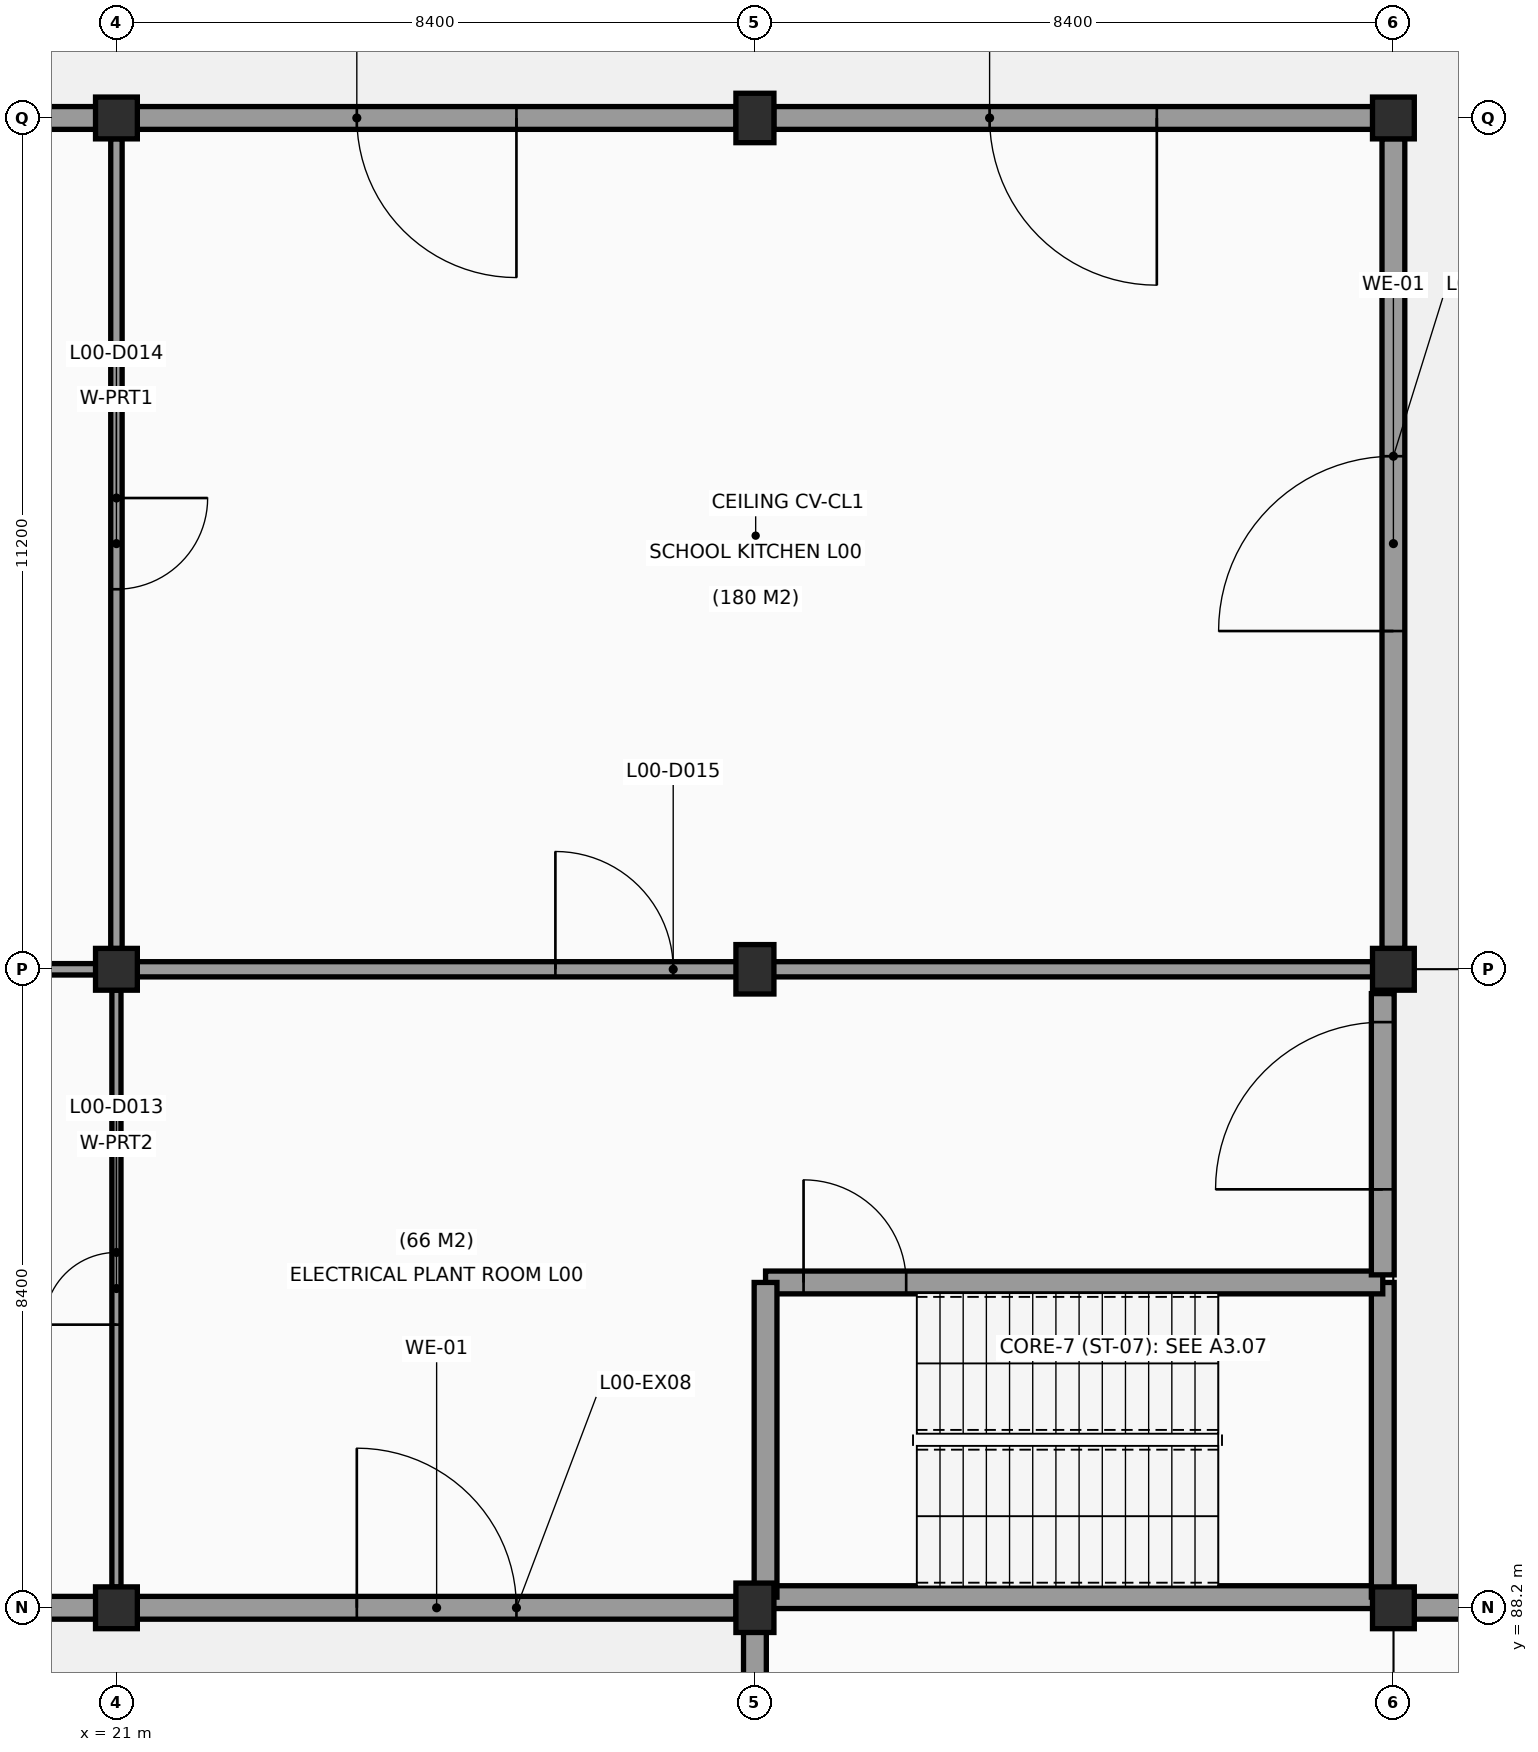
"""IFC4 building model, lengths in metres.
Left out: names, types, materials, properties, quantities, classifications, styles, units other than length and angle.
Written with IfcOpenShell. Run it as: python <this file> out.ifc"""

import sys

from ifc_helpers import new_model, si_unit, direction, frame, frame_2d, origin, origin_2d, place, context, subcontext, project, spatial, rectangle, extrude, element, fill, save


model = new_model("IFC4")
c1 = context("Model", 3, precision=1e-05, world=origin(), true_north=direction((0.0, 1.0)))
c2 = subcontext(c1, "Body", "Model", "MODEL_VIEW")
j1 = project(units=[si_unit("LENGTHUNIT", "METRE"), si_unit("PLANEANGLEUNIT", "RADIAN")], contexts=[c1])
p1 = place(None, origin())
s1 = spatial("IfcSite", under=j1, at=p1, CompositionType="ELEMENT")
p2 = place(p1, origin())
s2 = spatial("IfcBuilding", under=s1, at=p2, CompositionType="ELEMENT")
p3 = place(p2, origin())
s3 = spatial("IfcBuildingStorey", under=s2, at=p3, CompositionType="ELEMENT", Elevation=0.0)
for number, where, z_axis, x_axis in (
    (1, (21.0, 88.2, -0.4), (0.0, 0.0, 1.0), (1.0, 0.0, 0.0)),
    (2, (21.0, 96.6, -0.4), (0.0, 0.0, 1.0), (1.0, 0.0, 0.0)),
    (3, (21.0, 107.8, -0.4), (0.0, 0.0, 1.0), (1.0, 0.0, 0.0)),
):
    element("IfcColumn", number, at=place(p3, frame(where, z_axis=z_axis, x_axis=x_axis)), inside=s3, PredefinedType="COLUMN", context=c2, shape_type="SweptSolid", body=[
        extrude(rectangle(XDim=0.55, YDim=0.55, at=origin_2d()), origin(), (0.0, 0.0, 1.0), 4.6),
    ])
for number, where, z_axis, x_axis in (
    (4, (29.4, 88.2, -0.4), (0.0, 0.0, 1.0), (1.0, 0.0, 0.0)),
    (5, (29.4, 96.6, -0.4), (0.0, 0.0, 1.0), (1.0, 0.0, 0.0)),
    (6, (29.4, 107.8, -0.4), (0.0, 0.0, 1.0), (1.0, 0.0, 0.0)),
):
    element("IfcColumn", number, at=place(p3, frame(where, z_axis=z_axis, x_axis=x_axis)), inside=s3, PredefinedType="COLUMN", context=c2, shape_type="SweptSolid", body=[
        extrude(rectangle(XDim=0.5, YDim=0.65, at=origin_2d()), origin(), (0.0, 0.0, 1.0), 4.6),
    ])
for number, where, z_axis, x_axis in (
    (7, (37.8, 88.2, -0.4), (0.0, 0.0, 1.0), (1.0, 0.0, 0.0)),
    (8, (37.8, 96.6, -0.4), (0.0, 0.0, 1.0), (1.0, 0.0, 0.0)),
    (9, (37.8, 107.8, -0.4), (0.0, 0.0, 1.0), (1.0, 0.0, 0.0)),
):
    element("IfcColumn", number, at=place(p3, frame(where, z_axis=z_axis, x_axis=x_axis)), inside=s3, PredefinedType="COLUMN", context=c2, shape_type="SweptSolid", body=[
        extrude(rectangle(XDim=0.55, YDim=0.55, at=origin_2d()), origin(), (0.0, 0.0, 1.0), 4.6),
    ])
p4 = place(p3, frame((29.4, 80.123, 0.0), z_axis=(0.0, 0.0, 1.0), x_axis=(0.0, 1.0, 0.0)))
e10 = element("IfcWall", 10, at=p4, inside=s3, PredefinedType="SOLIDWALL", context=c2, shape_type="SweptSolid", body=[
    extrude(rectangle(XDim=7.754, YDim=0.3, at=frame_2d((3.877, 0.0))), origin(), (0.0, 0.0, 1.0), 3.22),
])
p5 = place(p4, frame((2.877, 0.0, 0.0)))
e11 = element("IfcOpeningElement", 11, at=p5, cuts=e10, PredefinedType="OPENING", context=c2, shape_type="SweptSolid", body=[
    extrude(rectangle(XDim=2.0, YDim=2.25, at=frame_2d((1.0, 1.125))), frame((0.0, 0.16, 0.0), z_axis=(0.0, -1.0, 0.0), x_axis=(1.0, 0.0, 0.0)), (0.0, 0.0, 1.0), 0.32),
])
p6 = place(p3, frame((29.152, 88.2, 0.0), z_axis=(0.0, 0.0, 1.0), x_axis=(-1.0, 0.0, 0.0)))
e12 = element("IfcWall", 12, at=p6, inside=s3, PredefinedType="SOLIDWALL", context=c2, shape_type="SweptSolid", body=[
    extrude(rectangle(XDim=7.879, YDim=0.3, at=frame_2d((3.939, 0.0))), origin(), (0.0, 0.0, 1.0), 3.22),
])
p7 = place(p6, frame((2.889, 0.0, 0.0)))
e13 = element("IfcOpeningElement", 13, at=p7, cuts=e12, PredefinedType="OPENING", context=c2, shape_type="SweptSolid", body=[
    extrude(rectangle(XDim=2.1, YDim=2.3, at=frame_2d((1.05, 1.15))), frame((0.0, 0.16, 0.0), z_axis=(0.0, -1.0, 0.0), x_axis=(1.0, 0.0, 0.0)), (0.0, 0.0, 1.0), 0.32),
])
p8 = place(p3, frame((20.727, 88.2, 0.0), z_axis=(0.0, 0.0, 1.0), x_axis=(-1.0, 0.0, 0.0)))
e14 = element("IfcWall", 14, at=p8, inside=s3, PredefinedType="SOLIDWALL", context=c2, shape_type="SweptSolid", body=[
    extrude(rectangle(XDim=7.854, YDim=0.3, at=frame_2d((3.927, 0.0))), origin(), (0.0, 0.0, 1.0), 3.22),
])
p9 = place(p8, frame((2.827, 0.0, 0.0)))
e15 = element("IfcOpeningElement", 15, at=p9, cuts=e14, PredefinedType="OPENING", context=c2, shape_type="SweptSolid", body=[
    extrude(rectangle(XDim=2.2, YDim=2.35, at=frame_2d((1.1, 1.175))), frame((0.0, 0.16, 0.0), z_axis=(0.0, -1.0, 0.0), x_axis=(1.0, 0.0, 0.0)), (0.0, 0.0, 1.0), 0.32),
])
p10 = place(p3, frame((12.873, 107.8, 0.0), z_axis=(0.0, 0.0, 1.0), x_axis=(1.0, 0.0, 0.0)))
e16 = element("IfcWall", 16, at=p10, inside=s3, PredefinedType="SOLIDWALL", context=c2, shape_type="SweptSolid", body=[
    extrude(rectangle(XDim=7.854, YDim=0.3, at=frame_2d((3.927, 0.0))), origin(), (0.0, 0.0, 1.0), 3.22),
])
p11 = place(p10, frame((2.927, 0.0, 0.0)))
e17 = element("IfcOpeningElement", 17, at=p11, cuts=e16, PredefinedType="OPENING", context=c2, shape_type="SweptSolid", body=[
    extrude(rectangle(XDim=2.0, YDim=2.25, at=frame_2d((1.0, 1.125))), frame((0.0, 0.16, 0.0), z_axis=(0.0, -1.0, 0.0), x_axis=(1.0, 0.0, 0.0)), (0.0, 0.0, 1.0), 0.32),
])
p12 = place(p3, frame((21.273, 107.8, 0.0), z_axis=(0.0, 0.0, 1.0), x_axis=(1.0, 0.0, 0.0)))
e18 = element("IfcWall", 18, at=p12, inside=s3, PredefinedType="SOLIDWALL", context=c2, shape_type="SweptSolid", body=[
    extrude(rectangle(XDim=7.879, YDim=0.3, at=frame_2d((3.939, 0.0))), origin(), (0.0, 0.0, 1.0), 3.22),
])
p13 = place(p12, frame((2.889, 0.0, 0.0)))
e19 = element("IfcOpeningElement", 19, at=p13, cuts=e18, PredefinedType="OPENING", context=c2, shape_type="SweptSolid", body=[
    extrude(rectangle(XDim=2.1, YDim=2.3, at=frame_2d((1.05, 1.15))), frame((0.0, 0.16, 0.0), z_axis=(0.0, -1.0, 0.0), x_axis=(1.0, 0.0, 0.0)), (0.0, 0.0, 1.0), 0.32),
])
p14 = place(p3, frame((29.648, 107.8, 0.0), z_axis=(0.0, 0.0, 1.0), x_axis=(1.0, 0.0, 0.0)))
e20 = element("IfcWall", 20, at=p14, inside=s3, PredefinedType="SOLIDWALL", context=c2, shape_type="SweptSolid", body=[
    extrude(rectangle(XDim=7.879, YDim=0.3, at=frame_2d((3.939, 0.0))), origin(), (0.0, 0.0, 1.0), 3.22),
])
p15 = place(p14, frame((2.84, 0.0, 0.0)))
e21 = element("IfcOpeningElement", 21, at=p15, cuts=e20, PredefinedType="OPENING", context=c2, shape_type="SweptSolid", body=[
    extrude(rectangle(XDim=2.2, YDim=2.35, at=frame_2d((1.1, 1.175))), frame((0.0, 0.16, 0.0), z_axis=(0.0, -1.0, 0.0), x_axis=(1.0, 0.0, 0.0)), (0.0, 0.0, 1.0), 0.32),
])
p16 = place(p3, frame((37.8, 107.527, 0.0), z_axis=(0.0, 0.0, 1.0), x_axis=(0.0, -1.0, 0.0)))
e22 = element("IfcWall", 22, at=p16, inside=s3, PredefinedType="SOLIDWALL", context=c2, shape_type="SweptSolid", body=[
    extrude(rectangle(XDim=10.654, YDim=0.3, at=frame_2d((5.327, 0.0))), origin(), (0.0, 0.0, 1.0), 3.22),
])
p17 = place(p16, frame((4.177, 0.0, 0.0)))
e23 = element("IfcOpeningElement", 23, at=p17, cuts=e22, PredefinedType="OPENING", context=c2, shape_type="SweptSolid", body=[
    extrude(rectangle(XDim=2.3, YDim=2.4, at=frame_2d((1.15, 1.2))), frame((0.0, 0.16, 0.0), z_axis=(0.0, -1.0, 0.0), x_axis=(1.0, 0.0, 0.0)), (0.0, 0.0, 1.0), 0.32),
])
p18 = place(p3, frame((38.073, 88.2, 0.0), z_axis=(0.0, 0.0, 1.0), x_axis=(1.0, 0.0, 0.0)))
e24 = element("IfcWall", 24, at=p18, inside=s3, PredefinedType="SOLIDWALL", context=c2, shape_type="SweptSolid", body=[
    extrude(rectangle(XDim=2.479, YDim=0.3, at=frame_2d((1.24, 0.0))), origin(), (0.0, 0.0, 1.0), 3.22),
])
p19 = place(p18, frame((0.639, 0.0, 0.95)))
e25 = element("IfcOpeningElement", 25, at=p19, cuts=e24, PredefinedType="OPENING", context=c2, shape_type="SweptSolid", body=[
    extrude(rectangle(XDim=1.2, YDim=1.5, at=frame_2d((0.6, 0.75))), frame((0.0, 0.16, 0.0), z_axis=(0.0, -1.0, 0.0), x_axis=(1.0, 0.0, 0.0)), (0.0, 0.0, 1.0), 0.32),
])
p20 = place(p3, frame((29.54, 88.34, -0.4), z_axis=(0.0, 0.0, 1.0), x_axis=(1.0, 0.0, 0.0)))
e26 = element("IfcWall", 26, at=p20, inside=s3, PredefinedType="SHEAR", context=c2, shape_type="SweptSolid", body=[
    extrude(rectangle(XDim=8.12, YDim=0.3, at=frame_2d((4.06, 0.0))), origin(), (0.0, 0.0, 1.0), 4.6),
])
p21 = place(p3, frame((37.66, 88.34, -0.4), z_axis=(0.0, 0.0, 1.0), x_axis=(0.0, 1.0, 0.0)))
e27 = element("IfcWall", 27, at=p21, inside=s3, PredefinedType="SHEAR", context=c2, shape_type="SweptSolid", body=[
    extrude(rectangle(XDim=4.14, YDim=0.3, at=frame_2d((2.07, 0.0))), origin(), (0.0, 0.0, 1.0), 4.6),
])
p22 = place(p3, frame((37.66, 92.48, -0.4), z_axis=(0.0, 0.0, 1.0), x_axis=(-1.0, 0.0, 0.0)))
e28 = element("IfcWall", 28, at=p22, inside=s3, PredefinedType="SHEAR", context=c2, shape_type="SweptSolid", body=[
    extrude(rectangle(XDim=8.12, YDim=0.3, at=frame_2d((4.06, 0.0))), origin(), (0.0, 0.0, 1.0), 4.6),
])
p23 = place(p22, frame((6.27, 0.0, 0.4)))
e29 = element("IfcOpeningElement", 29, at=p23, cuts=e28, PredefinedType="OPENING", context=c2, shape_type="SweptSolid", body=[
    extrude(rectangle(XDim=1.35, YDim=2.15, at=frame_2d((0.675, 1.075))), frame((0.0, 0.16, 0.0), z_axis=(0.0, -1.0, 0.0), x_axis=(1.0, 0.0, 0.0)), (0.0, 0.0, 1.0), 0.32),
])
p24 = place(p3, frame((29.54, 92.48, -0.4), z_axis=(0.0, 0.0, 1.0), x_axis=(0.0, -1.0, 0.0)))
e30 = element("IfcWall", 30, at=p24, inside=s3, PredefinedType="SHEAR", context=c2, shape_type="SweptSolid", body=[
    extrude(rectangle(XDim=4.14, YDim=0.3, at=frame_2d((2.07, 0.0))), origin(), (0.0, 0.0, 1.0), 4.6),
])
p25 = place(p3, frame((37.66, 92.58, -0.4), z_axis=(0.0, 0.0, 1.0), x_axis=(0.0, 1.0, 0.0)))
e31 = element("IfcWall", 31, at=p25, inside=s3, PredefinedType="SHEAR", context=c2, shape_type="SweptSolid", body=[
    extrude(rectangle(XDim=3.7, YDim=0.3, at=frame_2d((1.85, 0.0))), origin(), (0.0, 0.0, 1.0), 4.32),
])
p26 = place(p25, frame((1.125, 0.0, 0.4)))
e32 = element("IfcOpeningElement", 32, at=p26, cuts=e31, PredefinedType="OPENING", context=c2, shape_type="SweptSolid", body=[
    extrude(rectangle(XDim=2.2, YDim=2.35, at=frame_2d((1.1, 1.175))), frame((0.0, 0.16, 0.0), z_axis=(0.0, -1.0, 0.0), x_axis=(1.0, 0.0, 0.0)), (0.0, 0.0, 1.0), 0.32),
])
p27 = place(p3, frame((4.473, 96.6, 0.0), z_axis=(0.0, 0.0, 1.0), x_axis=(1.0, 0.0, 0.0)))
e33 = element("IfcWall", 33, at=p27, inside=s3, PredefinedType="PARTITIONING", context=c2, shape_type="SweptSolid", body=[
    extrude(rectangle(XDim=16.254, YDim=0.15, at=frame_2d((8.127, 0.0))), origin(), (0.0, 0.0, 1.0), 3.92),
])
p28 = place(p3, frame((21.0, 96.327, 0.0), z_axis=(0.0, 0.0, 1.0), x_axis=(0.0, -1.0, 0.0)))
e34 = element("IfcWall", 34, at=p28, inside=s3, PredefinedType="PARTITIONING", context=c2, shape_type="SweptSolid", body=[
    extrude(rectangle(XDim=7.854, YDim=0.12, at=frame_2d((3.927, 0.0))), origin(), (0.0, 0.0, 1.0), 3.22),
])
p29 = place(p28, frame((3.452, 0.0, 0.0)))
e35 = element("IfcOpeningElement", 35, at=p29, cuts=e34, PredefinedType="OPENING", context=c2, shape_type="SweptSolid", body=[
    extrude(rectangle(XDim=0.95, YDim=2.1, at=frame_2d((0.475, 1.05))), frame((0.0, 0.07, 0.0), z_axis=(0.0, -1.0, 0.0), x_axis=(1.0, 0.0, 0.0)), (0.0, 0.0, 1.0), 0.14),
])
p30 = place(p3, frame((21.0, 107.527, 0.0), z_axis=(0.0, 0.0, 1.0), x_axis=(0.0, -1.0, 0.0)))
e36 = element("IfcWall", 36, at=p30, inside=s3, PredefinedType="PARTITIONING", context=c2, shape_type="SweptSolid", body=[
    extrude(rectangle(XDim=10.654, YDim=0.15, at=frame_2d((5.327, 0.0))), origin(), (0.0, 0.0, 1.0), 3.22),
])
p31 = place(p30, frame((4.727, 0.0, 0.0)))
e37 = element("IfcOpeningElement", 37, at=p31, cuts=e36, PredefinedType="OPENING", context=c2, shape_type="SweptSolid", body=[
    extrude(rectangle(XDim=1.2, YDim=2.15, at=frame_2d((0.6, 1.075))), frame((0.0, 0.085, 0.0), z_axis=(0.0, -1.0, 0.0), x_axis=(1.0, 0.0, 0.0)), (0.0, 0.0, 1.0), 0.17),
])
p32 = place(p3, frame((37.527, 96.6, 0.0), z_axis=(0.0, 0.0, 1.0), x_axis=(-1.0, 0.0, 0.0)))
e38 = element("IfcWall", 38, at=p32, inside=s3, PredefinedType="PARTITIONING", context=c2, shape_type="SweptSolid", body=[
    extrude(rectangle(XDim=16.254, YDim=0.2, at=frame_2d((8.127, 0.0))), origin(), (0.0, 0.0, 1.0), 3.53),
])
p33 = place(p32, frame((9.202, 0.0, 0.0)))
e39 = element("IfcOpeningElement", 39, at=p33, cuts=e38, PredefinedType="OPENING", context=c2, shape_type="SweptSolid", body=[
    extrude(rectangle(XDim=1.55, YDim=2.2, at=frame_2d((0.775, 1.1))), frame((0.0, 0.11, 0.0), z_axis=(0.0, -1.0, 0.0), x_axis=(1.0, 0.0, 0.0)), (0.0, 0.0, 1.0), 0.22),
])
p34 = place(p7, origin())
e40 = element("IfcDoor", 40, at=p34, inside=s3, OperationType="DOUBLE_DOOR_SINGLE_SWING", PredefinedType="DOOR", context=c2, shape_type="SweptSolid", body=[
    extrude(rectangle(XDim=2.1, YDim=2.3, at=frame_2d((1.05, 1.15))), frame((0.0, 0.025, 0.0), z_axis=(0.0, -1.0, 0.0), x_axis=(1.0, 0.0, 0.0)), (0.0, 0.0, 1.0), 0.05),
])
fill(e13, e40)
p35 = place(p13, origin())
e41 = element("IfcDoor", 41, at=p35, inside=s3, OperationType="DOUBLE_DOOR_SINGLE_SWING", PredefinedType="DOOR", context=c2, shape_type="SweptSolid", body=[
    extrude(rectangle(XDim=2.1, YDim=2.3, at=frame_2d((1.05, 1.15))), frame((0.0, 0.025, 0.0), z_axis=(0.0, -1.0, 0.0), x_axis=(1.0, 0.0, 0.0)), (0.0, 0.0, 1.0), 0.05),
])
fill(e19, e41)
p36 = place(p15, origin())
e42 = element("IfcDoor", 42, at=p36, inside=s3, OperationType="DOUBLE_DOOR_SINGLE_SWING", PredefinedType="DOOR", context=c2, shape_type="SweptSolid", body=[
    extrude(rectangle(XDim=2.2, YDim=2.35, at=frame_2d((1.1, 1.175))), frame((0.0, 0.025, 0.0), z_axis=(0.0, -1.0, 0.0), x_axis=(1.0, 0.0, 0.0)), (0.0, 0.0, 1.0), 0.05),
])
fill(e21, e42)
p37 = place(p17, origin())
e43 = element("IfcDoor", 43, at=p37, inside=s3, OperationType="DOUBLE_DOOR_SINGLE_SWING", PredefinedType="DOOR", context=c2, shape_type="SweptSolid", body=[
    extrude(rectangle(XDim=2.3, YDim=2.4, at=frame_2d((1.15, 1.2))), frame((0.0, 0.025, 0.0), z_axis=(0.0, -1.0, 0.0), x_axis=(1.0, 0.0, 0.0)), (0.0, 0.0, 1.0), 0.05),
])
fill(e23, e43)
p38 = place(p23, origin())
e44 = element("IfcDoor", 44, at=p38, inside=s3, OperationType="SINGLE_SWING_RIGHT", PredefinedType="DOOR", context=c2, shape_type="SweptSolid", body=[
    extrude(rectangle(XDim=1.35, YDim=2.15, at=frame_2d((0.675, 1.075))), frame((0.0, 0.025, 0.0), z_axis=(0.0, -1.0, 0.0), x_axis=(1.0, 0.0, 0.0)), (0.0, 0.0, 1.0), 0.05),
])
fill(e29, e44)
p39 = place(p26, origin())
e45 = element("IfcDoor", 45, at=p39, inside=s3, OperationType="SINGLE_SWING_LEFT", PredefinedType="DOOR", context=c2, shape_type="SweptSolid", body=[
    extrude(rectangle(XDim=2.2, YDim=2.35, at=frame_2d((1.1, 1.175))), frame((0.0, 0.025, 0.0), z_axis=(0.0, -1.0, 0.0), x_axis=(1.0, 0.0, 0.0)), (0.0, 0.0, 1.0), 0.05),
])
fill(e32, e45)
p40 = place(p29, origin())
e46 = element("IfcDoor", 46, at=p40, inside=s3, OperationType="SINGLE_SWING_RIGHT", PredefinedType="DOOR", context=c2, shape_type="SweptSolid", body=[
    extrude(rectangle(XDim=0.95, YDim=2.1, at=frame_2d((0.475, 1.05))), frame((0.0, 0.025, 0.0), z_axis=(0.0, -1.0, 0.0), x_axis=(1.0, 0.0, 0.0)), (0.0, 0.0, 1.0), 0.05),
])
fill(e35, e46)
p41 = place(p31, origin())
e47 = element("IfcDoor", 47, at=p41, inside=s3, OperationType="SINGLE_SWING_LEFT", PredefinedType="DOOR", context=c2, shape_type="SweptSolid", body=[
    extrude(rectangle(XDim=1.2, YDim=2.15, at=frame_2d((0.6, 1.075))), frame((0.0, 0.025, 0.0), z_axis=(0.0, -1.0, 0.0), x_axis=(1.0, 0.0, 0.0)), (0.0, 0.0, 1.0), 0.05),
])
fill(e37, e47)
p42 = place(p33, origin())
e48 = element("IfcDoor", 48, at=p42, inside=s3, OperationType="DOUBLE_DOOR_SINGLE_SWING", PredefinedType="DOOR", context=c2, shape_type="SweptSolid", body=[
    extrude(rectangle(XDim=1.55, YDim=2.2, at=frame_2d((0.775, 1.1))), frame((0.0, 0.025, 0.0), z_axis=(0.0, -1.0, 0.0), x_axis=(1.0, 0.0, 0.0)), (0.0, 0.0, 1.0), 0.05),
])
fill(e39, e48)
save(model, sys.argv[1])
